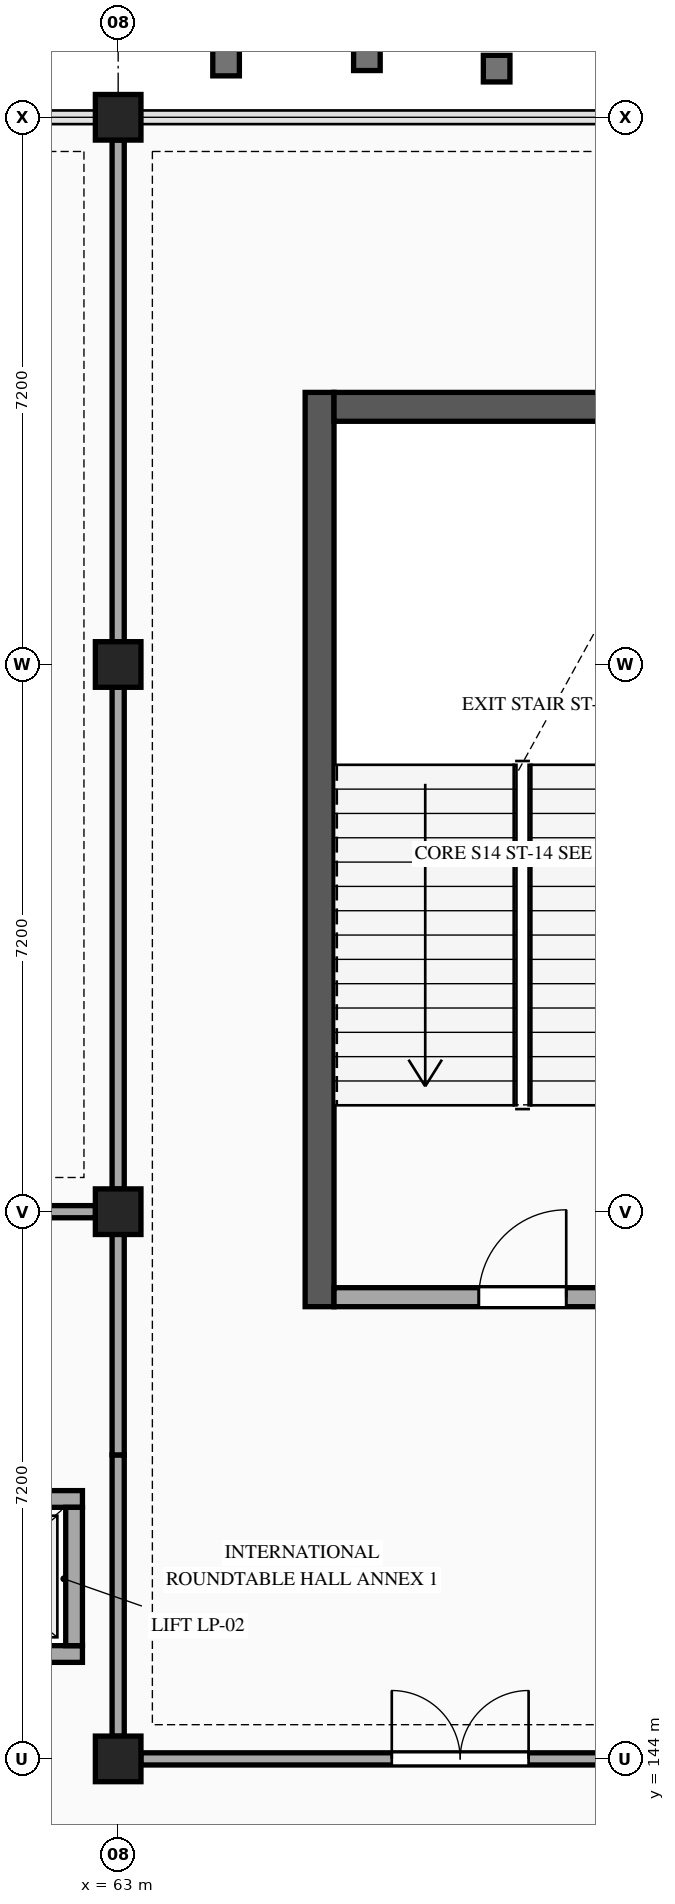
"""IFC4 building model, lengths in metres.
Left out: names, types, materials, properties, quantities, classifications, styles, units other than length and angle.
Written with IfcOpenShell. Run it as: python <this file> out.ifc"""

import sys

from ifc_helpers import new_model, si_unit, direction, frame, frame_2d, origin, origin_2d, place, context, subcontext, project, spatial, rectangle, extrude, element, fill, save


model = new_model("IFC4")
c1 = context("Model", 3, precision=1e-05, world=origin(), true_north=direction((0.0, 1.0)))
c2 = subcontext(c1, "Body", "Model", "MODEL_VIEW")
j1 = project(units=[si_unit("LENGTHUNIT", "METRE"), si_unit("PLANEANGLEUNIT", "RADIAN")], contexts=[c1])
p1 = place(None, origin())
s1 = spatial("IfcSite", under=j1, at=p1, CompositionType="ELEMENT")
p2 = place(p1, origin())
s2 = spatial("IfcBuilding", under=s1, at=p2, CompositionType="ELEMENT")
p3 = place(p2, frame((0.0, 0.0, 15.3)))
s3 = spatial("IfcBuildingStorey", under=s2, at=p3, CompositionType="ELEMENT", Elevation=15.3)
for number, where, z_axis, x_axis in (
    (1, (63.0, 144.0, 0.0), (0.0, 0.0, 1.0), (1.0, 0.0, 0.0)),
    (2, (63.0, 151.2, 0.0), (0.0, 0.0, 1.0), (1.0, 0.0, 0.0)),
    (3, (63.0, 158.4, 0.0), (0.0, 0.0, 1.0), (1.0, 0.0, 0.0)),
    (4, (63.0, 165.6, 0.0), (0.0, 0.0, 1.0), (1.0, 0.0, 0.0)),
):
    element("IfcColumn", number, at=place(p3, frame(where, z_axis=z_axis, x_axis=x_axis)), inside=s3, PredefinedType="COLUMN", context=c2, shape_type="SweptSolid", body=[
        extrude(rectangle(XDim=0.6, YDim=0.6, at=origin_2d()), origin(), (0.0, 0.0, 1.0), 4.5),
    ])
p4 = place(p3, frame((65.65, 149.95, 0.0), z_axis=(0.0, 0.0, 1.0), x_axis=(0.0, 1.0, 0.0)))
e5 = element("IfcWall", 5, at=p4, inside=s3, PredefinedType="SHEAR", context=c2, shape_type="SweptSolid", body=[
    extrude(rectangle(XDim=12.03, YDim=0.38, at=frame_2d((6.015, 0.0))), origin(), (0.0, 0.0, 1.0), 4.25),
])
p5 = place(p3, frame((65.84, 161.79, 0.0), z_axis=(0.0, 0.0, 1.0), x_axis=(1.0, 0.0, 0.0)))
e6 = element("IfcWall", 6, at=p5, inside=s3, PredefinedType="SHEAR", context=c2, shape_type="SweptSolid", body=[
    extrude(rectangle(XDim=4.96, YDim=0.38, at=frame_2d((2.48, 0.0))), origin(), (0.0, 0.0, 1.0), 4.25),
])
p6 = place(p3, frame((59.87, 145.38, 0.0), z_axis=(0.0, 0.0, 1.0), x_axis=(1.0, 0.0, 0.0)))
e7 = element("IfcWall", 7, at=p6, inside=s3, PredefinedType="STANDARD", context=c2, shape_type="SweptSolid", body=[
    extrude(rectangle(XDim=2.66, YDim=0.22, at=frame_2d((1.33, 0.0))), origin(), (0.0, 0.0, 1.0), 4.25),
])
p7 = place(p6, frame((0.73, 0.0, 0.0)))
e8 = element("IfcOpeningElement", 8, at=p7, cuts=e7, PredefinedType="OPENING", context=c2, shape_type="SweptSolid", body=[
    extrude(rectangle(XDim=1.2, YDim=2.2, at=frame_2d((0.6, 1.1))), frame((0.0, 0.12, 0.0), z_axis=(0.0, -1.0, 0.0), x_axis=(1.0, 0.0, 0.0)), (0.0, 0.0, 1.0), 0.24),
])
p8 = place(p3, frame((62.53, 147.42, 0.0), z_axis=(0.0, 0.0, 1.0), x_axis=(-1.0, 0.0, 0.0)))
e9 = element("IfcWall", 9, at=p8, inside=s3, PredefinedType="STANDARD", context=c2, shape_type="SweptSolid", body=[
    extrude(rectangle(XDim=2.66, YDim=0.22, at=frame_2d((1.33, 0.0))), origin(), (0.0, 0.0, 1.0), 4.25),
])
p9 = place(p3, frame((62.42, 145.49, 0.0), z_axis=(0.0, 0.0, 1.0), x_axis=(0.0, 1.0, 0.0)))
e10 = element("IfcWall", 10, at=p9, inside=s3, PredefinedType="STANDARD", context=c2, shape_type="SweptSolid", body=[
    extrude(rectangle(XDim=1.82, YDim=0.22, at=frame_2d((0.91, 0.0))), origin(), (0.0, 0.0, 1.0), 4.25),
])
p10 = place(p3, frame((65.84, 150.075, 0.0), z_axis=(0.0, 0.0, 1.0), x_axis=(1.0, 0.0, 0.0)))
e11 = element("IfcWall", 11, at=p10, inside=s3, PredefinedType="STANDARD", context=c2, shape_type="SweptSolid", body=[
    extrude(rectangle(XDim=4.96, YDim=0.25, at=frame_2d((2.48, 0.0))), origin(), (0.0, 0.0, 1.0), 4.25),
])
p11 = place(p10, frame((1.905, 0.0, 0.0)))
e12 = element("IfcOpeningElement", 12, at=p11, cuts=e11, PredefinedType="OPENING", context=c2, shape_type="SweptSolid", body=[
    extrude(rectangle(XDim=1.15, YDim=2.2, at=frame_2d((0.575, 1.1))), frame((0.0, 0.135, 0.0), z_axis=(0.0, -1.0, 0.0), x_axis=(1.0, 0.0, 0.0)), (0.0, 0.0, 1.0), 0.27),
])
p12 = place(p3, frame((63.298, 144.0, 0.0), z_axis=(0.0, 0.0, 1.0), x_axis=(1.0, 0.0, 0.0)))
e13 = element("IfcWall", 13, at=p12, inside=s3, PredefinedType="PARTITIONING", context=c2, shape_type="SweptSolid", body=[
    extrude(rectangle(XDim=8.404, YDim=0.16, at=frame_2d((4.202, 0.0))), origin(), (0.0, 0.0, 1.0), 3.638),
])
p13 = place(p12, frame((3.302, 0.0, 0.0)))
e14 = element("IfcOpeningElement", 14, at=p13, cuts=e13, PredefinedType="OPENING", context=c2, shape_type="SweptSolid", body=[
    extrude(rectangle(XDim=1.8, YDim=2.25, at=frame_2d((0.9, 1.125))), frame((0.0, 0.09, 0.0), z_axis=(0.0, -1.0, 0.0), x_axis=(1.0, 0.0, 0.0)), (0.0, 0.0, 1.0), 0.18),
])
p14 = place(p3, frame((54.298, 151.2, 0.0), z_axis=(0.0, 0.0, 1.0), x_axis=(1.0, 0.0, 0.0)))
e15 = element("IfcWall", 15, at=p14, inside=s3, PredefinedType="PARTITIONING", context=c2, shape_type="SweptSolid", body=[
    extrude(rectangle(XDim=8.404, YDim=0.16, at=frame_2d((4.202, 0.0))), origin(), (0.0, 0.0, 1.0), 3.336),
])
p15 = place(p14, frame((3.302, 0.0, 0.0)))
e16 = element("IfcOpeningElement", 16, at=p15, cuts=e15, PredefinedType="OPENING", context=c2, shape_type="SweptSolid", body=[
    extrude(rectangle(XDim=1.8, YDim=2.25, at=frame_2d((0.9, 1.125))), frame((0.0, 0.09, 0.0), z_axis=(0.0, -1.0, 0.0), x_axis=(1.0, 0.0, 0.0)), (0.0, 0.0, 1.0), 0.18),
])
p16 = place(p3, frame((63.0, 144.298, 0.0), z_axis=(0.0, 0.0, 1.0), x_axis=(0.0, 1.0, 0.0)))
e17 = element("IfcWall", 17, at=p16, inside=s3, PredefinedType="PARTITIONING", context=c2, shape_type="SweptSolid", body=[
    extrude(rectangle(XDim=3.702, YDim=0.16, at=frame_2d((1.851, 0.0))), origin(), (0.0, 0.0, 1.0), 3.336),
])
p17 = place(p3, frame((63.0, 148.0, 0.0), z_axis=(0.0, 0.0, 1.0), x_axis=(0.0, 1.0, 0.0)))
e18 = element("IfcWall", 18, at=p17, inside=s3, PredefinedType="PARTITIONING", context=c2, shape_type="SweptSolid", body=[
    extrude(rectangle(XDim=2.902, YDim=0.16, at=frame_2d((1.451, 0.0))), origin(), (0.0, 0.0, 1.0), 3.336),
])
for number, where, z_axis, x_axis in (
    (19, (63.0, 151.498, 0.0), (0.0, 0.0, 1.0), (0.0, 1.0, 0.0)),
    (20, (63.0, 158.698, 0.0), (0.0, 0.0, 1.0), (0.0, 1.0, 0.0)),
):
    element("IfcWall", number, at=place(p3, frame(where, z_axis=z_axis, x_axis=x_axis)), inside=s3, PredefinedType="PARTITIONING", context=c2, shape_type="SweptSolid", body=[
        extrude(rectangle(XDim=6.604, YDim=0.16, at=frame_2d((3.302, 0.0))), origin(), (0.0, 0.0, 1.0), 3.336),
    ])
p18 = place(p11, origin())
e21 = element("IfcDoor", 21, at=p18, inside=s3, OperationType="SINGLE_SWING_RIGHT", PredefinedType="DOOR", context=c2, shape_type="SweptSolid", body=[
    extrude(rectangle(XDim=1.15, YDim=2.2, at=frame_2d((0.575, 1.1))), frame((0.0, 0.025, 0.0), z_axis=(0.0, -1.0, 0.0), x_axis=(1.0, 0.0, 0.0)), (0.0, 0.0, 1.0), 0.05),
])
fill(e12, e21)
p19 = place(p13, origin())
e22 = element("IfcDoor", 22, at=p19, inside=s3, OperationType="DOUBLE_DOOR_SINGLE_SWING", PredefinedType="DOOR", context=c2, shape_type="SweptSolid", body=[
    extrude(rectangle(XDim=1.8, YDim=2.25, at=frame_2d((0.9, 1.125))), frame((0.0, 0.025, 0.0), z_axis=(0.0, -1.0, 0.0), x_axis=(1.0, 0.0, 0.0)), (0.0, 0.0, 1.0), 0.05),
])
fill(e14, e22)
save(model, sys.argv[1])
